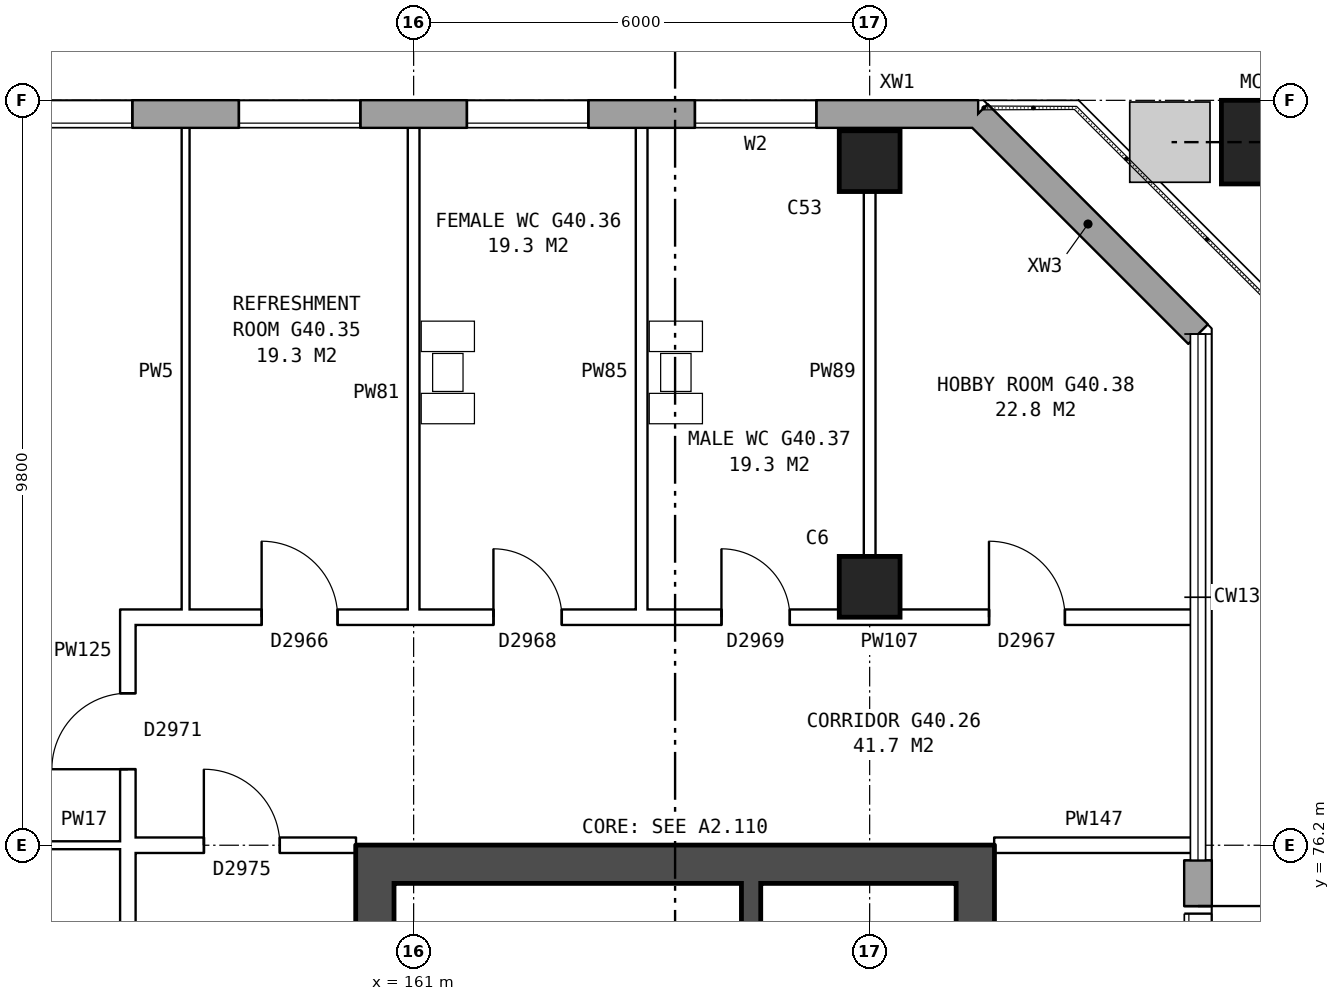
"""IFC4 building model, lengths in metres.
Left out: names, types, materials, properties, quantities, classifications, styles, units other than length and angle.
Written with IfcOpenShell. Run it as: python <this file> out.ifc"""

import sys

from ifc_helpers import new_model, si_unit, direction, frame, frame_2d, origin, origin_2d, place, context, subcontext, project, spatial, rectangle, hollow_rectangle, extrude, element, fill, save


model = new_model("IFC4")
c1 = context("Model", 3, precision=1e-05, world=origin(), true_north=direction((0.0, 1.0)))
c2 = subcontext(c1, "Body", "Model", "MODEL_VIEW")
j1 = project(units=[si_unit("LENGTHUNIT", "METRE"), si_unit("PLANEANGLEUNIT", "RADIAN")], contexts=[c1])
p1 = place(None, origin())
s1 = spatial("IfcSite", under=j1, at=p1, CompositionType="ELEMENT")
p2 = place(p1, origin())
s2 = spatial("IfcBuilding", under=s1, at=p2, CompositionType="ELEMENT")
p3 = place(p2, frame((0.0, 0.0, 142.3)))
s3 = spatial("IfcBuildingStorey", under=s2, at=p3, CompositionType="ELEMENT", Elevation=142.3)
for number, where, z_axis, x_axis in (
    (1, (167.0, 79.6, 0.0), (0.0, 0.0, 1.0), (1.0, 0.0, 0.0)),
    (2, (167.0, 85.2, 0.0), (0.0, 0.0, 1.0), (1.0, 0.0, 0.0)),
):
    element("IfcColumn", number, at=place(p3, frame(where, z_axis=z_axis, x_axis=x_axis)), inside=s3, PredefinedType="COLUMN", context=c2, shape_type="SweptSolid", body=[
        extrude(rectangle(XDim=0.8, YDim=0.8, at=origin_2d()), origin(), (0.0, 0.0, 1.0), 5.6),
    ])
p4 = place(p3, frame((172.178, 85.45, 0.109), z_axis=(-0.19761602731, 0.0, 0.980279503892), x_axis=(0.0, -1.0, 0.0)))
e3 = element("IfcColumn", 3, at=p4, inside=s3, PredefinedType="COLUMN", context=c2, shape_type="SweptSolid", body=[
    extrude(hollow_rectangle(XDim=1.1, YDim=1.1, WallThickness=0.06, at=origin_2d()), origin(), (0.0, 0.0, 1.0), 6.103),
])
p5 = place(p3, frame((171.32, 73.0, 0.0), z_axis=(0.0, 0.0, 1.0), x_axis=(0.0, 1.0, 0.0)))
e4 = element("IfcWall", 4, at=p5, inside=s3, PredefinedType="STANDARD", context=c2, shape_type="SweptSolid", body=[
    extrude(rectangle(XDim=3.0, YDim=0.36, at=frame_2d((1.5, 0.0))), origin(), (0.0, 0.0, 1.0), 5.6),
])
p6 = place(p5, frame((0.7, 0.0, 3.4)))
e5 = element("IfcOpeningElement", 5, at=p6, cuts=e4, PredefinedType="OPENING", context=c2, shape_type="SweptSolid", body=[
    extrude(rectangle(XDim=1.6, YDim=1.2, at=frame_2d((0.8, 0.6))), frame((0.0, 0.19, 0.0), z_axis=(0.0, -1.0, 0.0), x_axis=(1.0, 0.0, 0.0)), (0.0, 0.0, 1.0), 0.38),
])
p7 = place(p5, frame((0.6, 0.0, 0.0)))
e6 = element("IfcOpeningElement", 6, at=p7, cuts=e4, PredefinedType="OPENING", context=c2, shape_type="SweptSolid", body=[
    extrude(rectangle(XDim=1.8, YDim=2.4, at=frame_2d((0.9, 1.2))), frame((0.0, 0.19, 0.0), z_axis=(0.0, -1.0, 0.0), x_axis=(1.0, 0.0, 0.0)), (0.0, 0.0, 1.0), 0.38),
])
p8 = place(p3, frame((171.32, 82.925, 0.0), z_axis=(0.0, 0.0, 1.0), x_axis=(-0.707106781187, 0.707106781187, 0.0)))
e7 = element("IfcWall", 7, at=p8, inside=s3, PredefinedType="STANDARD", context=c2, shape_type="SweptSolid", body=[
    extrude(rectangle(XDim=4.094, YDim=0.36, at=frame_2d((2.047, 0.0))), origin(), (0.0, 0.0, 1.0), 5.6),
])
p9 = place(p3, frame((168.425, 85.82, 0.0), z_axis=(0.0, 0.0, 1.0), x_axis=(-1.0, 0.0, 0.0)))
e8 = element("IfcWall", 8, at=p9, inside=s3, PredefinedType="STANDARD", context=c2, shape_type="SweptSolid", body=[
    extrude(rectangle(XDim=34.351, YDim=0.36, at=frame_2d((17.175, 0.0))), origin(), (0.0, 0.0, 1.0), 5.6),
])
p10 = place(p9, frame((2.125, 0.0, 0.15)))
e9 = element("IfcOpeningElement", 9, at=p10, cuts=e8, PredefinedType="OPENING", context=c2, shape_type="SweptSolid", body=[
    extrude(rectangle(XDim=1.6, YDim=2.4, at=frame_2d((0.8, 1.2))), frame((0.0, 0.19, 0.0), z_axis=(0.0, -1.0, 0.0), x_axis=(1.0, 0.0, 0.0)), (0.0, 0.0, 1.0), 0.38),
])
p11 = place(p9, frame((5.125, 0.0, 0.15)))
e10 = element("IfcOpeningElement", 10, at=p11, cuts=e8, PredefinedType="OPENING", context=c2, shape_type="SweptSolid", body=[
    extrude(rectangle(XDim=1.6, YDim=2.4, at=frame_2d((0.8, 1.2))), frame((0.0, 0.19, 0.0), z_axis=(0.0, -1.0, 0.0), x_axis=(1.0, 0.0, 0.0)), (0.0, 0.0, 1.0), 0.38),
])
p12 = place(p9, frame((8.125, 0.0, 0.15)))
e11 = element("IfcOpeningElement", 11, at=p12, cuts=e8, PredefinedType="OPENING", context=c2, shape_type="SweptSolid", body=[
    extrude(rectangle(XDim=1.6, YDim=2.4, at=frame_2d((0.8, 1.2))), frame((0.0, 0.19, 0.0), z_axis=(0.0, -1.0, 0.0), x_axis=(1.0, 0.0, 0.0)), (0.0, 0.0, 1.0), 0.38),
])
p13 = place(p9, frame((11.125, 0.0, 0.15)))
e12 = element("IfcOpeningElement", 12, at=p13, cuts=e8, PredefinedType="OPENING", context=c2, shape_type="SweptSolid", body=[
    extrude(rectangle(XDim=1.6, YDim=2.4, at=frame_2d((0.8, 1.2))), frame((0.0, 0.19, 0.0), z_axis=(0.0, -1.0, 0.0), x_axis=(1.0, 0.0, 0.0)), (0.0, 0.0, 1.0), 0.38),
])
p14 = place(p9, frame((14.125, 0.0, 0.15)))
e13 = element("IfcOpeningElement", 13, at=p14, cuts=e8, PredefinedType="OPENING", context=c2, shape_type="SweptSolid", body=[
    extrude(rectangle(XDim=1.6, YDim=2.4, at=frame_2d((0.8, 1.2))), frame((0.0, 0.19, 0.0), z_axis=(0.0, -1.0, 0.0), x_axis=(1.0, 0.0, 0.0)), (0.0, 0.0, 1.0), 0.38),
])
p15 = place(p9, frame((17.125, 0.0, 0.15)))
e14 = element("IfcOpeningElement", 14, at=p15, cuts=e8, PredefinedType="OPENING", context=c2, shape_type="SweptSolid", body=[
    extrude(rectangle(XDim=1.6, YDim=2.4, at=frame_2d((0.8, 1.2))), frame((0.0, 0.19, 0.0), z_axis=(0.0, -1.0, 0.0), x_axis=(1.0, 0.0, 0.0)), (0.0, 0.0, 1.0), 0.38),
])
p16 = place(p9, frame((20.125, 0.0, 0.15)))
e15 = element("IfcOpeningElement", 15, at=p16, cuts=e8, PredefinedType="OPENING", context=c2, shape_type="SweptSolid", body=[
    extrude(rectangle(XDim=1.6, YDim=2.4, at=frame_2d((0.8, 1.2))), frame((0.0, 0.19, 0.0), z_axis=(0.0, -1.0, 0.0), x_axis=(1.0, 0.0, 0.0)), (0.0, 0.0, 1.0), 0.38),
])
p17 = place(p9, frame((23.125, 0.0, 0.15)))
e16 = element("IfcOpeningElement", 16, at=p17, cuts=e8, PredefinedType="OPENING", context=c2, shape_type="SweptSolid", body=[
    extrude(rectangle(XDim=1.6, YDim=2.4, at=frame_2d((0.8, 1.2))), frame((0.0, 0.19, 0.0), z_axis=(0.0, -1.0, 0.0), x_axis=(1.0, 0.0, 0.0)), (0.0, 0.0, 1.0), 0.38),
])
p18 = place(p9, frame((26.125, 0.0, 0.15)))
e17 = element("IfcOpeningElement", 17, at=p18, cuts=e8, PredefinedType="OPENING", context=c2, shape_type="SweptSolid", body=[
    extrude(rectangle(XDim=1.6, YDim=2.4, at=frame_2d((0.8, 1.2))), frame((0.0, 0.19, 0.0), z_axis=(0.0, -1.0, 0.0), x_axis=(1.0, 0.0, 0.0)), (0.0, 0.0, 1.0), 0.38),
])
p19 = place(p9, frame((29.125, 0.0, 0.15)))
e18 = element("IfcOpeningElement", 18, at=p19, cuts=e8, PredefinedType="OPENING", context=c2, shape_type="SweptSolid", body=[
    extrude(rectangle(XDim=1.6, YDim=2.4, at=frame_2d((0.8, 1.2))), frame((0.0, 0.19, 0.0), z_axis=(0.0, -1.0, 0.0), x_axis=(1.0, 0.0, 0.0)), (0.0, 0.0, 1.0), 0.38),
])
p20 = place(p9, frame((32.125, 0.0, 0.15)))
e19 = element("IfcOpeningElement", 19, at=p20, cuts=e8, PredefinedType="OPENING", context=c2, shape_type="SweptSolid", body=[
    extrude(rectangle(XDim=1.6, YDim=2.4, at=frame_2d((0.8, 1.2))), frame((0.0, 0.19, 0.0), z_axis=(0.0, -1.0, 0.0), x_axis=(1.0, 0.0, 0.0)), (0.0, 0.0, 1.0), 0.38),
])
p21 = place(p3, frame((160.49, 76.2, 0.0), z_axis=(0.0, 0.0, 1.0), x_axis=(0.0, -1.0, 0.0)))
e20 = element("IfcWall", 20, at=p21, inside=s3, PredefinedType="SHEAR", context=c2, shape_type="SweptSolid", body=[
    extrude(rectangle(XDim=12.4, YDim=0.5, at=frame_2d((6.2, 0.0))), origin(), (0.0, 0.0, 1.0), 5.6),
])
p22 = place(p21, frame((1.325, 0.0, 0.0)))
e21 = element("IfcOpeningElement", 21, at=p22, cuts=e20, PredefinedType="OPENING", context=c2, shape_type="SweptSolid", body=[
    extrude(rectangle(XDim=1.1, YDim=2.1, at=frame_2d((0.55, 1.05))), frame((0.0, 0.26, 0.0), z_axis=(0.0, -1.0, 0.0), x_axis=(1.0, 0.0, 0.0)), (0.0, 0.0, 1.0), 0.52),
])
p23 = place(p21, frame((3.625, 0.0, 0.0)))
e22 = element("IfcOpeningElement", 22, at=p23, cuts=e20, PredefinedType="OPENING", context=c2, shape_type="SweptSolid", body=[
    extrude(rectangle(XDim=0.85, YDim=2.1, at=frame_2d((0.425, 1.05))), frame((0.0, 0.26, 0.0), z_axis=(0.0, -1.0, 0.0), x_axis=(1.0, 0.0, 0.0)), (0.0, 0.0, 1.0), 0.52),
])
p24 = place(p21, frame((5.775, 0.0, 0.0)))
e23 = element("IfcOpeningElement", 23, at=p24, cuts=e20, PredefinedType="OPENING", context=c2, shape_type="SweptSolid", body=[
    extrude(rectangle(XDim=0.85, YDim=2.1, at=frame_2d((0.425, 1.05))), frame((0.0, 0.26, 0.0), z_axis=(0.0, -1.0, 0.0), x_axis=(1.0, 0.0, 0.0)), (0.0, 0.0, 1.0), 0.52),
])
p25 = place(p21, frame((9.9, 0.0, 0.0)))
e24 = element("IfcOpeningElement", 24, at=p25, cuts=e20, PredefinedType="OPENING", context=c2, shape_type="SweptSolid", body=[
    extrude(rectangle(XDim=1.1, YDim=2.1, at=frame_2d((0.55, 1.05))), frame((0.0, 0.26, 0.0), z_axis=(0.0, -1.0, 0.0), x_axis=(1.0, 0.0, 0.0)), (0.0, 0.0, 1.0), 0.52),
])
p26 = place(p21, frame((8.125, 0.0, 0.0)))
e25 = element("IfcOpeningElement", 25, at=p26, cuts=e20, PredefinedType="OPENING", context=c2, shape_type="SweptSolid", body=[
    extrude(rectangle(XDim=0.85, YDim=2.1, at=frame_2d((0.425, 1.05))), frame((0.0, 0.26, 0.0), z_axis=(0.0, -1.0, 0.0), x_axis=(1.0, 0.0, 0.0)), (0.0, 0.0, 1.0), 0.52),
])
p27 = place(p3, frame((168.39, 76.2, 0.0), z_axis=(0.0, 0.0, 1.0), x_axis=(0.0, -1.0, 0.0)))
e26 = element("IfcWall", 26, at=p27, inside=s3, PredefinedType="SHEAR", context=c2, shape_type="SweptSolid", body=[
    extrude(rectangle(XDim=12.4, YDim=0.5, at=frame_2d((6.2, 0.0))), origin(), (0.0, 0.0, 1.0), 5.6),
])
p28 = place(p3, frame((160.74, 75.95, 0.0), z_axis=(0.0, 0.0, 1.0), x_axis=(1.0, 0.0, 0.0)))
e27 = element("IfcWall", 27, at=p28, inside=s3, PredefinedType="SHEAR", context=c2, shape_type="SweptSolid", body=[
    extrude(rectangle(XDim=7.4, YDim=0.5, at=frame_2d((3.7, 0.0))), origin(), (0.0, 0.0, 1.0), 5.6),
])
p29 = place(p3, frame((165.44, 75.7, 0.0), z_axis=(0.0, 0.0, 1.0), x_axis=(0.0, -1.0, 0.0)))
e28 = element("IfcWall", 28, at=p29, inside=s3, PredefinedType="SHEAR", context=c2, shape_type="SweptSolid", body=[
    extrude(rectangle(XDim=6.825, YDim=0.25, at=frame_2d((3.413, 0.0))), origin(), (0.0, 0.0, 1.0), 5.6),
])
p30 = place(p3, frame((157.24, 63.9, 0.0), z_axis=(0.0, 0.0, 1.0), x_axis=(0.0, 1.0, 0.0)))
e29 = element("IfcWall", 29, at=p30, inside=s3, PredefinedType="PARTITIONING", context=c2, shape_type="SweptSolid", body=[
    extrude(rectangle(XDim=12.2, YDim=0.2, at=frame_2d((6.1, 0.0))), origin(), (0.0, 0.0, 1.0), 5.6),
])
p31 = place(p30, frame((5.1, 0.0, 0.0)))
e30 = element("IfcOpeningElement", 30, at=p31, cuts=e29, PredefinedType="OPENING", context=c2, shape_type="SweptSolid", body=[
    extrude(rectangle(XDim=2.0, YDim=2.1, at=frame_2d((1.0, 1.05))), frame((0.0, 0.11, 0.0), z_axis=(0.0, -1.0, 0.0), x_axis=(1.0, 0.0, 0.0)), (0.0, 0.0, 1.0), 0.22),
])
p32 = place(p3, frame((168.64, 76.2, 0.0), z_axis=(0.0, 0.0, 1.0), x_axis=(1.0, 0.0, 0.0)))
e31 = element("IfcWall", 31, at=p32, inside=s3, PredefinedType="PARTITIONING", context=c2, shape_type="SweptSolid", body=[
    extrude(rectangle(XDim=2.62, YDim=0.2, at=frame_2d((1.31, 0.0))), origin(), (0.0, 0.0, 1.0), 5.6),
])
p33 = place(p3, frame((157.14, 76.2, 0.0), z_axis=(0.0, 0.0, 1.0), x_axis=(1.0, 0.0, 0.0)))
e32 = element("IfcWall", 32, at=p33, inside=s3, PredefinedType="PARTITIONING", context=c2, shape_type="SweptSolid", body=[
    extrude(rectangle(XDim=3.1, YDim=0.2, at=frame_2d((1.55, 0.0))), origin(), (0.0, 0.0, 1.0), 5.6),
])
p34 = place(p33, frame((1.1, 0.0, 0.0)))
e33 = element("IfcOpeningElement", 33, at=p34, cuts=e32, PredefinedType="OPENING", context=c2, shape_type="SweptSolid", body=[
    extrude(rectangle(XDim=1.0, YDim=2.1, at=frame_2d((0.5, 1.05))), frame((0.0, 0.11, 0.0), z_axis=(0.0, -1.0, 0.0), x_axis=(1.0, 0.0, 0.0)), (0.0, 0.0, 1.0), 0.22),
])
p35 = place(p3, frame((142.66, 76.2, 0.0), z_axis=(0.0, 0.0, 1.0), x_axis=(1.0, 0.0, 0.0)))
e34 = element("IfcWall", 34, at=p35, inside=s3, PredefinedType="PARTITIONING", context=c2, shape_type="SweptSolid", body=[
    extrude(rectangle(XDim=14.68, YDim=0.1, at=frame_2d((7.34, 0.0))), origin(), (0.0, 0.0, 1.0), 5.6),
])
p36 = place(p35, frame((3.22, 0.0, 0.0)))
e35 = element("IfcOpeningElement", 35, at=p36, cuts=e34, PredefinedType="OPENING", context=c2, shape_type="SweptSolid", body=[
    extrude(rectangle(XDim=1.0, YDim=2.1, at=frame_2d((0.5, 1.05))), frame((0.0, 0.06, 0.0), z_axis=(0.0, -1.0, 0.0), x_axis=(1.0, 0.0, 0.0)), (0.0, 0.0, 1.0), 0.12),
])
p37 = place(p35, frame((10.46, 0.0, 0.0)))
e36 = element("IfcOpeningElement", 36, at=p37, cuts=e34, PredefinedType="OPENING", context=c2, shape_type="SweptSolid", body=[
    extrude(rectangle(XDim=1.0, YDim=2.1, at=frame_2d((0.5, 1.05))), frame((0.0, 0.06, 0.0), z_axis=(0.0, -1.0, 0.0), x_axis=(1.0, 0.0, 0.0)), (0.0, 0.0, 1.0), 0.12),
])
p38 = place(p3, frame((157.14, 79.2, 0.0), z_axis=(0.0, 0.0, 1.0), x_axis=(1.0, 0.0, 0.0)))
e37 = element("IfcWall", 37, at=p38, inside=s3, PredefinedType="PARTITIONING", context=c2, shape_type="SweptSolid", body=[
    extrude(rectangle(XDim=14.12, YDim=0.2, at=frame_2d((7.06, 0.0))), origin(), (0.0, 0.0, 1.0), 5.6),
])
p39 = place(p38, frame((1.86, 0.0, 0.0)))
e38 = element("IfcOpeningElement", 38, at=p39, cuts=e37, PredefinedType="OPENING", context=c2, shape_type="SweptSolid", body=[
    extrude(rectangle(XDim=1.0, YDim=2.1, at=frame_2d((0.5, 1.05))), frame((0.0, 0.11, 0.0), z_axis=(0.0, -1.0, 0.0), x_axis=(1.0, 0.0, 0.0)), (0.0, 0.0, 1.0), 0.22),
])
p40 = place(p38, frame((4.91, 0.0, 0.0)))
e39 = element("IfcOpeningElement", 39, at=p40, cuts=e37, PredefinedType="OPENING", context=c2, shape_type="SweptSolid", body=[
    extrude(rectangle(XDim=0.9, YDim=2.1, at=frame_2d((0.45, 1.05))), frame((0.0, 0.11, 0.0), z_axis=(0.0, -1.0, 0.0), x_axis=(1.0, 0.0, 0.0)), (0.0, 0.0, 1.0), 0.22),
])
p41 = place(p38, frame((7.91, 0.0, 0.0)))
e40 = element("IfcOpeningElement", 40, at=p41, cuts=e37, PredefinedType="OPENING", context=c2, shape_type="SweptSolid", body=[
    extrude(rectangle(XDim=0.9, YDim=2.1, at=frame_2d((0.45, 1.05))), frame((0.0, 0.11, 0.0), z_axis=(0.0, -1.0, 0.0), x_axis=(1.0, 0.0, 0.0)), (0.0, 0.0, 1.0), 0.22),
])
p42 = place(p38, frame((11.43, 0.0, 0.0)))
e41 = element("IfcOpeningElement", 41, at=p42, cuts=e37, PredefinedType="OPENING", context=c2, shape_type="SweptSolid", body=[
    extrude(rectangle(XDim=1.0, YDim=2.1, at=frame_2d((0.5, 1.05))), frame((0.0, 0.11, 0.0), z_axis=(0.0, -1.0, 0.0), x_axis=(1.0, 0.0, 0.0)), (0.0, 0.0, 1.0), 0.22),
])
p43 = place(p3, frame((157.24, 76.1, 0.0), z_axis=(0.0, 0.0, 1.0), x_axis=(0.0, 1.0, 0.0)))
e42 = element("IfcWall", 42, at=p43, inside=s3, PredefinedType="PARTITIONING", context=c2, shape_type="SweptSolid", body=[
    extrude(rectangle(XDim=3.2, YDim=0.2, at=frame_2d((1.6, 0.0))), origin(), (0.0, 0.0, 1.0), 5.6),
])
p44 = place(p43, frame((1.1, 0.0, 0.0)))
e43 = element("IfcOpeningElement", 43, at=p44, cuts=e42, PredefinedType="OPENING", context=c2, shape_type="SweptSolid", body=[
    extrude(rectangle(XDim=1.0, YDim=2.1, at=frame_2d((0.5, 1.05))), frame((0.0, 0.11, 0.0), z_axis=(0.0, -1.0, 0.0), x_axis=(1.0, 0.0, 0.0)), (0.0, 0.0, 1.0), 0.22),
])
p45 = place(p3, frame((158.0, 79.1, 0.0), z_axis=(0.0, 0.0, 1.0), x_axis=(0.0, 1.0, 0.0)))
e44 = element("IfcWall", 44, at=p45, inside=s3, PredefinedType="PARTITIONING", context=c2, shape_type="SweptSolid", body=[
    extrude(rectangle(XDim=6.66, YDim=0.1, at=frame_2d((3.33, 0.0))), origin(), (0.0, 0.0, 1.0), 5.6),
])
for number, where, z_axis, x_axis in (
    (45, (161.0, 79.1, 0.0), (0.0, 0.0, 1.0), (0.0, 1.0, 0.0)),
    (46, (164.0, 79.1, 0.0), (0.0, 0.0, 1.0), (0.0, 1.0, 0.0)),
    (47, (167.0, 79.1, 0.0), (0.0, 0.0, 1.0), (0.0, 1.0, 0.0)),
):
    element("IfcWall", number, at=place(p3, frame(where, z_axis=z_axis, x_axis=x_axis)), inside=s3, PredefinedType="PLUMBINGWALL", context=c2, shape_type="SweptSolid", body=[
        extrude(rectangle(XDim=6.66, YDim=0.15, at=frame_2d((3.33, 0.0))), origin(), (0.0, 0.0, 1.0), 5.6),
    ])
p46 = place(p6, origin())
e48 = element("IfcWindow", 48, at=p46, inside=s3, PartitioningType="DOUBLE_PANEL_HORIZONTAL", PredefinedType="WINDOW", context=c2, shape_type="SweptSolid", body=[
    extrude(rectangle(XDim=1.6, YDim=1.2, at=frame_2d((0.8, 0.6))), frame((0.0, 0.15, 0.0), z_axis=(0.0, -1.0, 0.0), x_axis=(1.0, 0.0, 0.0)), (0.0, 0.0, 1.0), 0.06),
])
fill(e5, e48)
p47 = place(p7, frame((1.8, 0.0, 0.0), z_axis=(0.0, 0.0, 1.0), x_axis=(-1.0, 0.0, 0.0)))
e49 = element("IfcDoor", 49, at=p47, inside=s3, OperationType="DOUBLE_DOOR_SINGLE_SWING", PredefinedType="DOOR", context=c2, shape_type="SweptSolid", body=[
    extrude(rectangle(XDim=1.8, YDim=2.4, at=frame_2d((0.9, 1.2))), frame((0.0, 0.025, 0.0), z_axis=(0.0, -1.0, 0.0), x_axis=(1.0, 0.0, 0.0)), (0.0, 0.0, 1.0), 0.05),
])
fill(e6, e49)
p48 = place(p10, origin())
e50 = element("IfcWindow", 50, at=p48, inside=s3, PartitioningType="SINGLE_PANEL", PredefinedType="WINDOW", context=c2, shape_type="SweptSolid", body=[
    extrude(rectangle(XDim=1.6, YDim=2.4, at=frame_2d((0.8, 1.2))), frame((0.0, 0.15, 0.0), z_axis=(0.0, -1.0, 0.0), x_axis=(1.0, 0.0, 0.0)), (0.0, 0.0, 1.0), 0.06),
])
fill(e9, e50)
p49 = place(p11, origin())
e51 = element("IfcWindow", 51, at=p49, inside=s3, PartitioningType="SINGLE_PANEL", PredefinedType="WINDOW", context=c2, shape_type="SweptSolid", body=[
    extrude(rectangle(XDim=1.6, YDim=2.4, at=frame_2d((0.8, 1.2))), frame((0.0, 0.15, 0.0), z_axis=(0.0, -1.0, 0.0), x_axis=(1.0, 0.0, 0.0)), (0.0, 0.0, 1.0), 0.06),
])
fill(e10, e51)
p50 = place(p12, origin())
e52 = element("IfcWindow", 52, at=p50, inside=s3, PartitioningType="SINGLE_PANEL", PredefinedType="WINDOW", context=c2, shape_type="SweptSolid", body=[
    extrude(rectangle(XDim=1.6, YDim=2.4, at=frame_2d((0.8, 1.2))), frame((0.0, 0.15, 0.0), z_axis=(0.0, -1.0, 0.0), x_axis=(1.0, 0.0, 0.0)), (0.0, 0.0, 1.0), 0.06),
])
fill(e11, e52)
p51 = place(p13, origin())
e53 = element("IfcWindow", 53, at=p51, inside=s3, PartitioningType="SINGLE_PANEL", PredefinedType="WINDOW", context=c2, shape_type="SweptSolid", body=[
    extrude(rectangle(XDim=1.6, YDim=2.4, at=frame_2d((0.8, 1.2))), frame((0.0, 0.15, 0.0), z_axis=(0.0, -1.0, 0.0), x_axis=(1.0, 0.0, 0.0)), (0.0, 0.0, 1.0), 0.06),
])
fill(e12, e53)
p52 = place(p34, origin())
e54 = element("IfcDoor", 54, at=p52, inside=s3, OperationType="SINGLE_SWING_LEFT", PredefinedType="DOOR", context=c2, shape_type="SweptSolid", body=[
    extrude(rectangle(XDim=1.0, YDim=2.1, at=frame_2d((0.5, 1.05))), frame((0.0, 0.025, 0.0), z_axis=(0.0, -1.0, 0.0), x_axis=(1.0, 0.0, 0.0)), (0.0, 0.0, 1.0), 0.05),
])
fill(e33, e54)
p53 = place(p39, origin())
e55 = element("IfcDoor", 55, at=p53, inside=s3, OperationType="SINGLE_SWING_LEFT", PredefinedType="DOOR", context=c2, shape_type="SweptSolid", body=[
    extrude(rectangle(XDim=1.0, YDim=2.1, at=frame_2d((0.5, 1.05))), frame((0.0, 0.025, 0.0), z_axis=(0.0, -1.0, 0.0), x_axis=(1.0, 0.0, 0.0)), (0.0, 0.0, 1.0), 0.05),
])
fill(e38, e55)
p54 = place(p40, origin())
e56 = element("IfcDoor", 56, at=p54, inside=s3, OperationType="SINGLE_SWING_LEFT", PredefinedType="DOOR", context=c2, shape_type="SweptSolid", body=[
    extrude(rectangle(XDim=0.9, YDim=2.1, at=frame_2d((0.45, 1.05))), frame((0.0, 0.025, 0.0), z_axis=(0.0, -1.0, 0.0), x_axis=(1.0, 0.0, 0.0)), (0.0, 0.0, 1.0), 0.05),
])
fill(e39, e56)
p55 = place(p41, origin())
e57 = element("IfcDoor", 57, at=p55, inside=s3, OperationType="SINGLE_SWING_LEFT", PredefinedType="DOOR", context=c2, shape_type="SweptSolid", body=[
    extrude(rectangle(XDim=0.9, YDim=2.1, at=frame_2d((0.45, 1.05))), frame((0.0, 0.025, 0.0), z_axis=(0.0, -1.0, 0.0), x_axis=(1.0, 0.0, 0.0)), (0.0, 0.0, 1.0), 0.05),
])
fill(e40, e57)
p56 = place(p42, origin())
e58 = element("IfcDoor", 58, at=p56, inside=s3, OperationType="SINGLE_SWING_LEFT", PredefinedType="DOOR", context=c2, shape_type="SweptSolid", body=[
    extrude(rectangle(XDim=1.0, YDim=2.1, at=frame_2d((0.5, 1.05))), frame((0.0, 0.025, 0.0), z_axis=(0.0, -1.0, 0.0), x_axis=(1.0, 0.0, 0.0)), (0.0, 0.0, 1.0), 0.05),
])
fill(e41, e58)
p57 = place(p44, origin())
e59 = element("IfcDoor", 59, at=p57, inside=s3, OperationType="SINGLE_SWING_LEFT", PredefinedType="DOOR", context=c2, shape_type="SweptSolid", body=[
    extrude(rectangle(XDim=1.0, YDim=2.1, at=frame_2d((0.5, 1.05))), frame((0.0, 0.025, 0.0), z_axis=(0.0, -1.0, 0.0), x_axis=(1.0, 0.0, 0.0)), (0.0, 0.0, 1.0), 0.05),
])
fill(e43, e59)
save(model, sys.argv[1])
